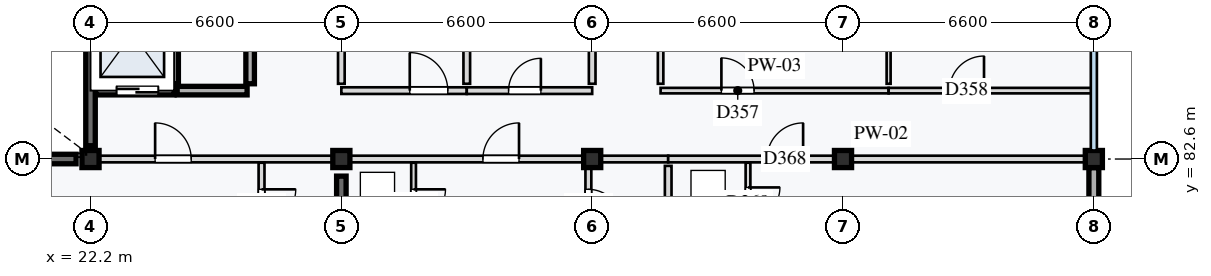
"""IFC4 building model, lengths in metres.
Left out: names, types, materials, properties, quantities, classifications, styles, units other than length and angle.
Written with IfcOpenShell. Run it as: python <this file> out.ifc"""

import sys

from ifc_helpers import new_model, si_unit, direction, frame, frame_2d, origin, origin_2d, place, context, subcontext, project, spatial, rectangle, extrude, element, fill, save


model = new_model("IFC4")
c1 = context("Model", 3, precision=1e-05, world=origin(), true_north=direction((0.0, 1.0)))
c2 = subcontext(c1, "Body", "Model", "MODEL_VIEW")
j1 = project(units=[si_unit("LENGTHUNIT", "METRE"), si_unit("PLANEANGLEUNIT", "RADIAN")], contexts=[c1])
p1 = place(None, origin())
s1 = spatial("IfcSite", under=j1, at=p1, CompositionType="ELEMENT")
p2 = place(p1, origin())
s2 = spatial("IfcBuilding", under=s1, at=p2, CompositionType="ELEMENT")
p3 = place(p2, frame((0.0, 0.0, 37.2)))
s3 = spatial("IfcBuildingStorey", under=s2, at=p3, CompositionType="ELEMENT", Elevation=37.2)
for number, where, z_axis, x_axis in (
    (1, (22.2, 82.6, 0.0), (0.0, 0.0, 1.0), (1.0, 0.0, 0.0)),
    (2, (28.8, 82.6, 0.0), (0.0, 0.0, 1.0), (1.0, 0.0, 0.0)),
    (3, (35.4, 82.6, 0.0), (0.0, 0.0, 1.0), (1.0, 0.0, 0.0)),
    (4, (42.0, 82.6, 0.0), (0.0, 0.0, 1.0), (1.0, 0.0, 0.0)),
    (5, (48.6, 82.6, 0.0), (0.0, 0.0, 1.0), (1.0, 0.0, 0.0)),
):
    element("IfcColumn", number, at=place(p3, frame(where, z_axis=z_axis, x_axis=x_axis)), inside=s3, PredefinedType="COLUMN", context=c2, shape_type="SweptSolid", body=[
        extrude(rectangle(XDim=0.45, YDim=0.45, at=origin_2d()), origin(), (0.0, 0.0, 1.0), 3.2),
    ])
p4 = place(p3, frame((15.98, 82.6, 0.0), z_axis=(0.0, 0.0, 1.0), x_axis=(1.0, 0.0, 0.0)))
e6 = element("IfcWall", 6, at=p4, inside=s3, PredefinedType="SHEAR", context=c2, shape_type="SweptSolid", body=[
    extrude(rectangle(XDim=5.84, YDim=0.25, at=frame_2d((2.92, 0.0))), origin(), (0.0, 0.0, 1.0), 2.97),
])
p5 = place(p3, frame((22.2, 82.95, 0.0), z_axis=(0.0, 0.0, 1.0), x_axis=(0.0, 1.0, 0.0)))
e7 = element("IfcWall", 7, at=p5, inside=s3, PredefinedType="SHEAR", context=c2, shape_type="SweptSolid", body=[
    extrude(rectangle(XDim=2.8, YDim=0.25, at=frame_2d((1.4, 0.0))), origin(), (0.0, 0.0, 1.0), 2.97),
])
p6 = place(p3, frame((28.8, 76.45, 0.0), z_axis=(0.0, 0.0, 1.0), x_axis=(0.0, 1.0, 0.0)))
e8 = element("IfcWall", 8, at=p6, inside=s3, PredefinedType="SHEAR", context=c2, shape_type="SweptSolid", body=[
    extrude(rectangle(XDim=5.7, YDim=0.25, at=frame_2d((2.85, 0.0))), origin(), (0.0, 0.0, 1.0), 2.97),
])
p7 = place(p3, frame((48.6, 76.225, 0.0), z_axis=(0.0, 0.0, 1.0), x_axis=(0.0, 1.0, 0.0)))
e9 = element("IfcWall", 9, at=p7, inside=s3, PredefinedType="STANDARD", context=c2, shape_type="SweptSolid", body=[
    extrude(rectangle(XDim=6.15, YDim=0.26, at=frame_2d((3.075, 0.0))), origin(), (0.0, 0.0, 1.0), 2.65),
])
p8 = place(p3, frame((22.335, 84.4, 0.0), z_axis=(0.0, 0.0, 1.0), x_axis=(1.0, 0.0, 0.0)))
e10 = element("IfcWall", 10, at=p8, inside=s3, PredefinedType="STANDARD", context=c2, shape_type="SweptSolid", body=[
    extrude(rectangle(XDim=2.065, YDim=0.225, at=frame_2d((1.032, 0.0))), origin(), (0.0, 0.0, 1.0), 2.97),
])
p9 = place(p8, frame((0.55, 0.0, 0.0)))
e11 = element("IfcOpeningElement", 11, at=p9, cuts=e10, PredefinedType="OPENING", context=c2, shape_type="SweptSolid", body=[
    extrude(rectangle(XDim=1.1, YDim=2.1, at=frame_2d((0.55, 1.05))), frame((0.0, 0.123, 0.0), z_axis=(0.0, -1.0, 0.0), x_axis=(1.0, 0.0, 0.0)), (0.0, 0.0, 1.0), 0.245),
])
p10 = place(p3, frame((24.48, 84.4, 0.0), z_axis=(0.0, 0.0, 1.0), x_axis=(1.0, 0.0, 0.0)))
e12 = element("IfcWall", 12, at=p10, inside=s3, PredefinedType="STANDARD", context=c2, shape_type="SweptSolid", body=[
    extrude(rectangle(XDim=1.84, YDim=0.225, at=frame_2d((0.92, 0.0))), origin(), (0.0, 0.0, 1.0), 2.97),
])
for number, where, z_axis, x_axis in (
    (13, (24.4, 84.58, 0.0), (0.0, 0.0, 1.0), (0.0, 1.0, 0.0)),
    (14, (26.4, 84.58, 0.0), (0.0, 0.0, 1.0), (0.0, 1.0, 0.0)),
):
    element("IfcWall", number, at=place(p3, frame(where, z_axis=z_axis, x_axis=x_axis)), inside=s3, PredefinedType="STANDARD", context=c2, shape_type="SweptSolid", body=[
        extrude(rectangle(XDim=2.64, YDim=0.225, at=frame_2d((1.32, 0.0))), origin(), (0.0, 0.0, 1.0), 2.97),
    ])
p11 = place(p3, frame((28.8, 84.4, 0.0), z_axis=(0.0, 0.0, 1.0), x_axis=(1.0, 0.0, 0.0)))
e15 = element("IfcWall", 15, at=p11, inside=s3, PredefinedType="PARTITIONING", context=c2, shape_type="SweptSolid", body=[
    extrude(rectangle(XDim=3.3, YDim=0.175, at=frame_2d((1.65, 0.0))), origin(), (0.0, 0.0, 1.0), 2.97),
])
p12 = place(p11, frame((1.8, 0.0, 0.0)))
e16 = element("IfcOpeningElement", 16, at=p12, cuts=e15, PredefinedType="OPENING", context=c2, shape_type="SweptSolid", body=[
    extrude(rectangle(XDim=1.0, YDim=2.16, at=frame_2d((0.5, 1.08))), frame((0.0, 0.097, 0.0), z_axis=(0.0, -1.0, 0.0), x_axis=(1.0, 0.0, 0.0)), (0.0, 0.0, 1.0), 0.195),
])
p13 = place(p3, frame((32.1, 84.4, 0.0), z_axis=(0.0, 0.0, 1.0), x_axis=(1.0, 0.0, 0.0)))
e17 = element("IfcWall", 17, at=p13, inside=s3, PredefinedType="PARTITIONING", context=c2, shape_type="SweptSolid", body=[
    extrude(rectangle(XDim=3.3, YDim=0.175, at=frame_2d((1.65, 0.0))), origin(), (0.0, 0.0, 1.0), 2.97),
])
p14 = place(p13, frame((1.1, 0.0, 0.0)))
e18 = element("IfcOpeningElement", 18, at=p14, cuts=e17, PredefinedType="OPENING", context=c2, shape_type="SweptSolid", body=[
    extrude(rectangle(XDim=0.85, YDim=2.0, at=frame_2d((0.425, 1.0))), frame((0.0, 0.097, 0.0), z_axis=(0.0, -1.0, 0.0), x_axis=(1.0, 0.0, 0.0)), (0.0, 0.0, 1.0), 0.195),
])
for number, where, z_axis, x_axis in (
    (19, (28.8, 84.58, 0.0), (0.0, 0.0, 1.0), (0.0, 1.0, 0.0)),
    (20, (32.1, 84.58, 0.0), (0.0, 0.0, 1.0), (0.0, 1.0, 0.0)),
    (21, (35.4, 84.58, 0.0), (0.0, 0.0, 1.0), (0.0, 1.0, 0.0)),
):
    element("IfcWall", number, at=place(p3, frame(where, z_axis=z_axis, x_axis=x_axis)), inside=s3, PredefinedType="PARTITIONING", context=c2, shape_type="SweptSolid", body=[
        extrude(rectangle(XDim=1.14, YDim=0.175, at=frame_2d((0.57, 0.0))), origin(), (0.0, 0.0, 1.0), 2.97),
    ])
p15 = place(p3, frame((37.2, 84.4, 0.0), z_axis=(0.0, 0.0, 1.0), x_axis=(1.0, 0.0, 0.0)))
e22 = element("IfcWall", 22, at=p15, inside=s3, PredefinedType="PARTITIONING", context=c2, shape_type="SweptSolid", body=[
    extrude(rectangle(XDim=6.0, YDim=0.145, at=frame_2d((3.0, 0.0))), origin(), (0.0, 0.0, 1.0), 2.97),
])
p16 = place(p15, frame((1.6, 0.0, 0.0)))
e23 = element("IfcOpeningElement", 23, at=p16, cuts=e22, PredefinedType="OPENING", context=c2, shape_type="SweptSolid", body=[
    extrude(rectangle(XDim=0.86, YDim=2.12, at=frame_2d((0.43, 1.06))), frame((0.0, 0.083, 0.0), z_axis=(0.0, -1.0, 0.0), x_axis=(1.0, 0.0, 0.0)), (0.0, 0.0, 1.0), 0.165),
])
p17 = place(p3, frame((43.2, 84.4, 0.0), z_axis=(0.0, 0.0, 1.0), x_axis=(1.0, 0.0, 0.0)))
e24 = element("IfcWall", 24, at=p17, inside=s3, PredefinedType="PARTITIONING", context=c2, shape_type="SweptSolid", body=[
    extrude(rectangle(XDim=5.4, YDim=0.145, at=frame_2d((2.7, 0.0))), origin(), (0.0, 0.0, 1.0), 2.97),
])
p18 = place(p17, frame((1.6, 0.0, 0.0)))
e25 = element("IfcOpeningElement", 25, at=p18, cuts=e24, PredefinedType="OPENING", context=c2, shape_type="SweptSolid", body=[
    extrude(rectangle(XDim=0.91, YDim=2.14, at=frame_2d((0.455, 1.07))), frame((0.0, 0.083, 0.0), z_axis=(0.0, -1.0, 0.0), x_axis=(1.0, 0.0, 0.0)), (0.0, 0.0, 1.0), 0.165),
])
p19 = place(p3, frame((43.2, 84.58, 0.0), z_axis=(0.0, 0.0, 1.0), x_axis=(0.0, 1.0, 0.0)))
e26 = element("IfcWall", 26, at=p19, inside=s3, PredefinedType="PARTITIONING", context=c2, shape_type="SweptSolid", body=[
    extrude(rectangle(XDim=2.64, YDim=0.105, at=frame_2d((1.32, 0.0))), origin(), (0.0, 0.0, 1.0), 2.97),
])
p20 = place(p3, frame((37.2, 84.58, 0.0), z_axis=(0.0, 0.0, 1.0), x_axis=(0.0, 1.0, 0.0)))
e27 = element("IfcWall", 27, at=p20, inside=s3, PredefinedType="PARTITIONING", context=c2, shape_type="SweptSolid", body=[
    extrude(rectangle(XDim=2.64, YDim=0.145, at=frame_2d((1.32, 0.0))), origin(), (0.0, 0.0, 1.0), 2.97),
])
p21 = place(p3, frame((22.2, 82.6, 0.0), z_axis=(0.0, 0.0, 1.0), x_axis=(1.0, 0.0, 0.0)))
e28 = element("IfcWall", 28, at=p21, inside=s3, PredefinedType="PARTITIONING", context=c2, shape_type="SweptSolid", body=[
    extrude(rectangle(XDim=6.6, YDim=0.175, at=frame_2d((3.3, 0.0))), origin(), (0.0, 0.0, 1.0), 2.55),
])
p22 = place(p21, frame((1.7, 0.0, 0.0)))
e29 = element("IfcOpeningElement", 29, at=p22, cuts=e28, PredefinedType="OPENING", context=c2, shape_type="SweptSolid", body=[
    extrude(rectangle(XDim=0.95, YDim=2.1, at=frame_2d((0.475, 1.05))), frame((0.0, 0.097, 0.0), z_axis=(0.0, -1.0, 0.0), x_axis=(1.0, 0.0, 0.0)), (0.0, 0.0, 1.0), 0.195),
])
p23 = place(p3, frame((26.7, 82.502, 0.0), z_axis=(0.0, 0.0, 1.0), x_axis=(0.0, -1.0, 0.0)))
e30 = element("IfcWall", 30, at=p23, inside=s3, PredefinedType="PARTITIONING", context=c2, shape_type="SweptSolid", body=[
    extrude(rectangle(XDim=2.302, YDim=0.155, at=frame_2d((1.151, 0.0))), origin(), (0.0, 0.0, 1.0), 2.97),
])
p24 = place(p23, frame((0.7, 0.0, 0.0)))
e31 = element("IfcOpeningElement", 31, at=p24, cuts=e30, PredefinedType="OPENING", context=c2, shape_type="SweptSolid", body=[
    extrude(rectangle(XDim=0.9, YDim=2.1, at=frame_2d((0.45, 1.05))), frame((0.0, 0.087, 0.0), z_axis=(0.0, -1.0, 0.0), x_axis=(1.0, 0.0, 0.0)), (0.0, 0.0, 1.0), 0.175),
])
p25 = place(p3, frame((28.8, 82.6, 0.0), z_axis=(0.0, 0.0, 1.0), x_axis=(1.0, 0.0, 0.0)))
e32 = element("IfcWall", 32, at=p25, inside=s3, PredefinedType="PARTITIONING", context=c2, shape_type="SweptSolid", body=[
    extrude(rectangle(XDim=8.6, YDim=0.175, at=frame_2d((4.3, 0.0))), origin(), (0.0, 0.0, 1.0), 2.55),
])
p26 = place(p25, frame((3.725, 0.0, 0.0)))
e33 = element("IfcOpeningElement", 33, at=p26, cuts=e32, PredefinedType="OPENING", context=c2, shape_type="SweptSolid", body=[
    extrude(rectangle(XDim=0.95, YDim=2.16, at=frame_2d((0.475, 1.08))), frame((0.0, 0.097, 0.0), z_axis=(0.0, -1.0, 0.0), x_axis=(1.0, 0.0, 0.0)), (0.0, 0.0, 1.0), 0.195),
])
p27 = place(p3, frame((30.7, 82.502, 0.0), z_axis=(0.0, 0.0, 1.0), x_axis=(0.0, -1.0, 0.0)))
e34 = element("IfcWall", 34, at=p27, inside=s3, PredefinedType="PARTITIONING", context=c2, shape_type="SweptSolid", body=[
    extrude(rectangle(XDim=2.302, YDim=0.125, at=frame_2d((1.151, 0.0))), origin(), (0.0, 0.0, 1.0), 2.97),
])
p28 = place(p27, frame((0.7, 0.0, 0.0)))
e35 = element("IfcOpeningElement", 35, at=p28, cuts=e34, PredefinedType="OPENING", context=c2, shape_type="SweptSolid", body=[
    extrude(rectangle(XDim=0.84, YDim=2.06, at=frame_2d((0.42, 1.03))), frame((0.0, 0.073, 0.0), z_axis=(0.0, -1.0, 0.0), x_axis=(1.0, 0.0, 0.0)), (0.0, 0.0, 1.0), 0.145),
])
p29 = place(p3, frame((35.3, 82.502, 0.0), z_axis=(0.0, 0.0, 1.0), x_axis=(0.0, -1.0, 0.0)))
e36 = element("IfcWall", 36, at=p29, inside=s3, PredefinedType="PARTITIONING", context=c2, shape_type="SweptSolid", body=[
    extrude(rectangle(XDim=2.302, YDim=0.155, at=frame_2d((1.151, 0.0))), origin(), (0.0, 0.0, 1.0), 2.97),
])
p30 = place(p29, frame((0.7, 0.0, 0.0)))
e37 = element("IfcOpeningElement", 37, at=p30, cuts=e36, PredefinedType="OPENING", context=c2, shape_type="SweptSolid", body=[
    extrude(rectangle(XDim=0.86, YDim=2.12, at=frame_2d((0.43, 1.06))), frame((0.0, 0.087, 0.0), z_axis=(0.0, -1.0, 0.0), x_axis=(1.0, 0.0, 0.0)), (0.0, 0.0, 1.0), 0.175),
])
p31 = place(p3, frame((37.4, 82.42, 0.0), z_axis=(0.0, 0.0, 1.0), x_axis=(0.0, -1.0, 0.0)))
e38 = element("IfcWall", 38, at=p31, inside=s3, PredefinedType="PARTITIONING", context=c2, shape_type="SweptSolid", body=[
    extrude(rectangle(XDim=2.132, YDim=0.175, at=frame_2d((1.066, 0.0))), origin(), (0.0, 0.0, 1.0), 2.97),
])
p32 = place(p3, frame((37.4, 82.6, 0.0), z_axis=(0.0, 0.0, 1.0), x_axis=(1.0, 0.0, 0.0)))
e39 = element("IfcWall", 39, at=p32, inside=s3, PredefinedType="PARTITIONING", context=c2, shape_type="SweptSolid", body=[
    extrude(rectangle(XDim=11.2, YDim=0.175, at=frame_2d((5.6, 0.0))), origin(), (0.0, 0.0, 1.0), 2.55),
])
p33 = place(p32, frame((2.6, 0.0, 0.0)))
e40 = element("IfcOpeningElement", 40, at=p33, cuts=e39, PredefinedType="OPENING", context=c2, shape_type="SweptSolid", body=[
    extrude(rectangle(XDim=0.95, YDim=2.16, at=frame_2d((0.475, 1.08))), frame((0.0, 0.097, 0.0), z_axis=(0.0, -1.0, 0.0), x_axis=(1.0, 0.0, 0.0)), (0.0, 0.0, 1.0), 0.195),
])
p34 = place(p3, frame((39.5, 82.502, 0.0), z_axis=(0.0, 0.0, 1.0), x_axis=(0.0, -1.0, 0.0)))
e41 = element("IfcWall", 41, at=p34, inside=s3, PredefinedType="PARTITIONING", context=c2, shape_type="SweptSolid", body=[
    extrude(rectangle(XDim=2.202, YDim=0.125, at=frame_2d((1.101, 0.0))), origin(), (0.0, 0.0, 1.0), 2.97),
])
p35 = place(p34, frame((0.65, 0.0, 0.0)))
e42 = element("IfcOpeningElement", 42, at=p35, cuts=e41, PredefinedType="OPENING", context=c2, shape_type="SweptSolid", body=[
    extrude(rectangle(XDim=0.84, YDim=2.06, at=frame_2d((0.42, 1.03))), frame((0.0, 0.073, 0.0), z_axis=(0.0, -1.0, 0.0), x_axis=(1.0, 0.0, 0.0)), (0.0, 0.0, 1.0), 0.145),
])
p36 = place(p9, origin())
e43 = element("IfcDoor", 43, at=p36, inside=s3, OperationType="DOUBLE_DOOR_SLIDING", PredefinedType="DOOR", context=c2, shape_type="SweptSolid", body=[
    extrude(rectangle(XDim=1.1, YDim=2.1, at=frame_2d((0.55, 1.05))), frame((0.0, 0.025, 0.0), z_axis=(0.0, -1.0, 0.0), x_axis=(1.0, 0.0, 0.0)), (0.0, 0.0, 1.0), 0.05),
])
fill(e11, e43)
p37 = place(p12, origin())
e44 = element("IfcDoor", 44, at=p37, inside=s3, OperationType="SINGLE_SWING_LEFT", PredefinedType="DOOR", context=c2, shape_type="SweptSolid", body=[
    extrude(rectangle(XDim=1.0, YDim=2.16, at=frame_2d((0.5, 1.08))), frame((0.0, 0.025, 0.0), z_axis=(0.0, -1.0, 0.0), x_axis=(1.0, 0.0, 0.0)), (0.0, 0.0, 1.0), 0.05),
])
fill(e16, e44)
p38 = place(p14, origin())
e45 = element("IfcDoor", 45, at=p38, inside=s3, OperationType="SINGLE_SWING_RIGHT", PredefinedType="DOOR", context=c2, shape_type="SweptSolid", body=[
    extrude(rectangle(XDim=0.85, YDim=2.0, at=frame_2d((0.425, 1.0))), frame((0.0, 0.025, 0.0), z_axis=(0.0, -1.0, 0.0), x_axis=(1.0, 0.0, 0.0)), (0.0, 0.0, 1.0), 0.05),
])
fill(e18, e45)
p39 = place(p16, origin())
e46 = element("IfcDoor", 46, at=p39, inside=s3, OperationType="SINGLE_SWING_LEFT", PredefinedType="DOOR", context=c2, shape_type="SweptSolid", body=[
    extrude(rectangle(XDim=0.86, YDim=2.12, at=frame_2d((0.43, 1.06))), frame((0.0, 0.025, 0.0), z_axis=(0.0, -1.0, 0.0), x_axis=(1.0, 0.0, 0.0)), (0.0, 0.0, 1.0), 0.05),
])
fill(e23, e46)
p40 = place(p18, origin())
e47 = element("IfcDoor", 47, at=p40, inside=s3, OperationType="SINGLE_SWING_RIGHT", PredefinedType="DOOR", context=c2, shape_type="SweptSolid", body=[
    extrude(rectangle(XDim=0.91, YDim=2.14, at=frame_2d((0.455, 1.07))), frame((0.0, 0.025, 0.0), z_axis=(0.0, -1.0, 0.0), x_axis=(1.0, 0.0, 0.0)), (0.0, 0.0, 1.0), 0.05),
])
fill(e25, e47)
p41 = place(p22, origin())
e48 = element("IfcDoor", 48, at=p41, inside=s3, OperationType="SINGLE_SWING_LEFT", PredefinedType="DOOR", context=c2, shape_type="SweptSolid", body=[
    extrude(rectangle(XDim=0.95, YDim=2.1, at=frame_2d((0.475, 1.05))), frame((0.0, 0.025, 0.0), z_axis=(0.0, -1.0, 0.0), x_axis=(1.0, 0.0, 0.0)), (0.0, 0.0, 1.0), 0.05),
])
fill(e29, e48)
p42 = place(p24, origin())
e49 = element("IfcDoor", 49, at=p42, inside=s3, OperationType="SINGLE_SWING_LEFT", PredefinedType="DOOR", context=c2, shape_type="SweptSolid", body=[
    extrude(rectangle(XDim=0.9, YDim=2.1, at=frame_2d((0.45, 1.05))), frame((0.0, 0.025, 0.0), z_axis=(0.0, -1.0, 0.0), x_axis=(1.0, 0.0, 0.0)), (0.0, 0.0, 1.0), 0.05),
])
fill(e31, e49)
p43 = place(p26, origin())
e50 = element("IfcDoor", 50, at=p43, inside=s3, OperationType="SINGLE_SWING_RIGHT", PredefinedType="DOOR", context=c2, shape_type="SweptSolid", body=[
    extrude(rectangle(XDim=0.95, YDim=2.16, at=frame_2d((0.475, 1.08))), frame((0.0, 0.025, 0.0), z_axis=(0.0, -1.0, 0.0), x_axis=(1.0, 0.0, 0.0)), (0.0, 0.0, 1.0), 0.05),
])
fill(e33, e50)
p44 = place(p28, origin())
e51 = element("IfcDoor", 51, at=p44, inside=s3, OperationType="SINGLE_SWING_LEFT", PredefinedType="DOOR", context=c2, shape_type="SweptSolid", body=[
    extrude(rectangle(XDim=0.84, YDim=2.06, at=frame_2d((0.42, 1.03))), frame((0.0, 0.025, 0.0), z_axis=(0.0, -1.0, 0.0), x_axis=(1.0, 0.0, 0.0)), (0.0, 0.0, 1.0), 0.05),
])
fill(e35, e51)
p45 = place(p30, origin())
e52 = element("IfcDoor", 52, at=p45, inside=s3, OperationType="SINGLE_SWING_RIGHT", PredefinedType="DOOR", context=c2, shape_type="SweptSolid", body=[
    extrude(rectangle(XDim=0.86, YDim=2.12, at=frame_2d((0.43, 1.06))), frame((0.0, 0.025, 0.0), z_axis=(0.0, -1.0, 0.0), x_axis=(1.0, 0.0, 0.0)), (0.0, 0.0, 1.0), 0.05),
])
fill(e37, e52)
p46 = place(p33, origin())
e53 = element("IfcDoor", 53, at=p46, inside=s3, OperationType="SINGLE_SWING_RIGHT", PredefinedType="DOOR", context=c2, shape_type="SweptSolid", body=[
    extrude(rectangle(XDim=0.95, YDim=2.16, at=frame_2d((0.475, 1.08))), frame((0.0, 0.025, 0.0), z_axis=(0.0, -1.0, 0.0), x_axis=(1.0, 0.0, 0.0)), (0.0, 0.0, 1.0), 0.05),
])
fill(e40, e53)
p47 = place(p35, origin())
e54 = element("IfcDoor", 54, at=p47, inside=s3, OperationType="SINGLE_SWING_LEFT", PredefinedType="DOOR", context=c2, shape_type="SweptSolid", body=[
    extrude(rectangle(XDim=0.84, YDim=2.06, at=frame_2d((0.42, 1.03))), frame((0.0, 0.025, 0.0), z_axis=(0.0, -1.0, 0.0), x_axis=(1.0, 0.0, 0.0)), (0.0, 0.0, 1.0), 0.05),
])
fill(e42, e54)
save(model, sys.argv[1])
